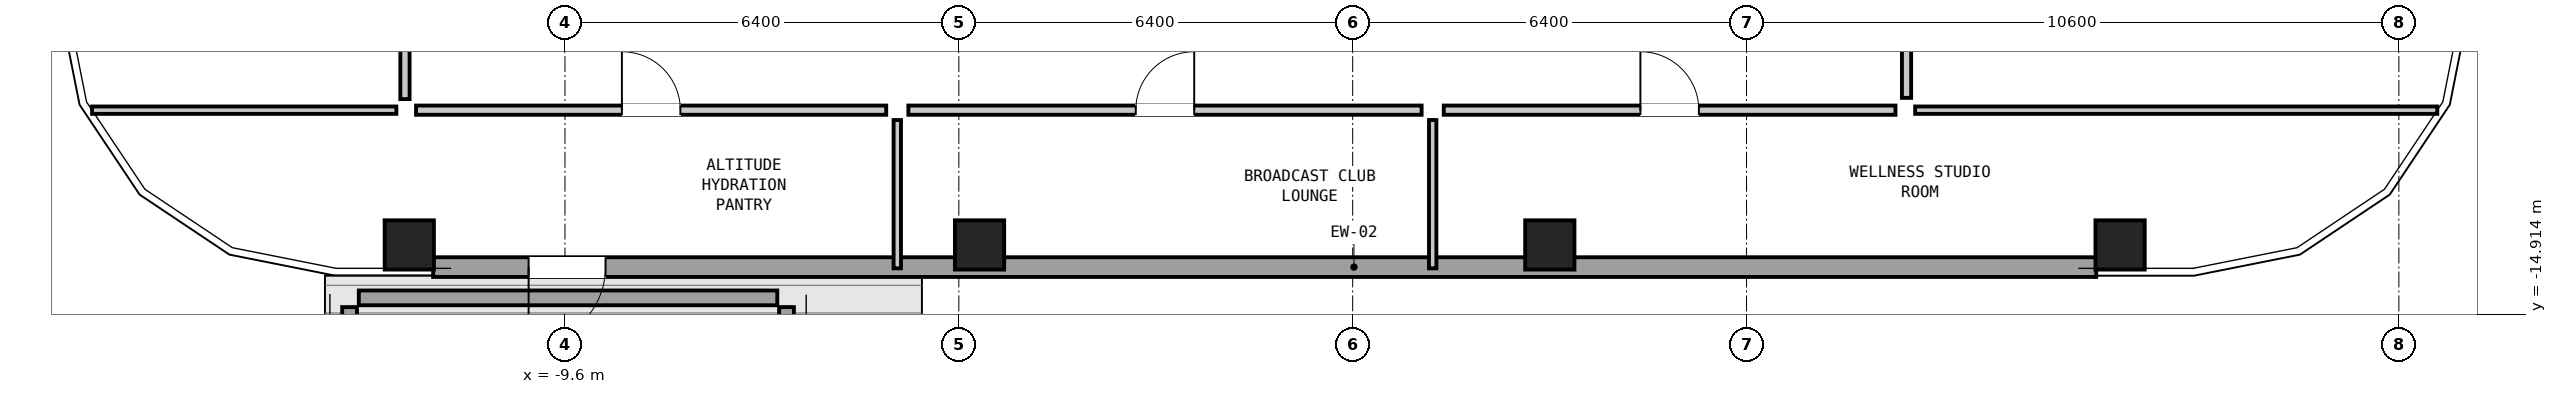
"""IFC4 building model, lengths in metres.
Left out: names, types, materials, properties, quantities, classifications, styles, units other than length and angle.
Written with IfcOpenShell. Run it as: python <this file> out.ifc"""

import sys

from ifc_helpers import new_model, si_unit, direction, frame, frame_2d, origin, origin_2d, place, context, subcontext, project, spatial, rectangle, hollow_rectangle, extrude, element, fill, save


model = new_model("IFC4")
c1 = context("Model", 3, precision=1e-05, world=origin(), true_north=direction((0.0, 1.0)))
c2 = subcontext(c1, "Body", "Model", "MODEL_VIEW")
j1 = project(units=[si_unit("LENGTHUNIT", "METRE"), si_unit("PLANEANGLEUNIT", "RADIAN")], contexts=[c1])
p1 = place(None, origin())
s1 = spatial("IfcSite", under=j1, at=p1, CompositionType="ELEMENT")
p2 = place(p1, origin())
s2 = spatial("IfcBuilding", under=s1, at=p2, CompositionType="ELEMENT")
p3 = place(p2, frame((0.0, 0.0, 104.85)))
s3 = spatial("IfcBuildingStorey", under=s2, at=p3, CompositionType="ELEMENT", Elevation=104.85)
for number, where, z_axis, x_axis in (
    (1, (-12.13, -13.79, 0.0), (0.0, 0.0, 1.0), (1.0, 0.0, 0.0)),
    (2, (-2.863, -13.79, 0.0), (0.0, 0.0, 1.0), (1.0, 0.0, 0.0)),
    (3, (6.403, -13.79, 0.0), (0.0, 0.0, 1.0), (1.0, 0.0, 0.0)),
    (4, (15.67, -13.79, 0.0), (0.0, 0.0, 1.0), (1.0, 0.0, 0.0)),
):
    element("IfcColumn", number, at=place(p3, frame(where, z_axis=z_axis, x_axis=x_axis)), inside=s3, PredefinedType="COLUMN", context=c2, shape_type="SweptSolid", body=[
        extrude(hollow_rectangle(XDim=0.8, YDim=0.8, WallThickness=0.05, at=origin_2d()), origin(), (0.0, 0.0, 1.0), 3.6),
    ])
p4 = place(p3, frame((-12.95, -14.65, 0.0), z_axis=(0.0, 0.0, 1.0), x_axis=(1.0, 0.0, 0.0)))
e5 = element("IfcWall", 5, at=p4, inside=s3, PredefinedType="PARAPET", context=c2, shape_type="SweptSolid", body=[
    extrude(rectangle(XDim=6.8, YDim=0.24, at=frame_2d((3.4, 0.0))), origin(), (0.0, 0.0, 1.0), 1.35),
])
for number, where, z_axis, x_axis in (
    (6, (-13.1, -16.7, 0.0), (0.0, 0.0, 1.0), (0.0, 1.0, 0.0)),
    (7, (-6.0, -16.7, 0.0), (0.0, 0.0, 1.0), (0.0, 1.0, 0.0)),
):
    element("IfcWall", number, at=place(p3, frame(where, z_axis=z_axis, x_axis=x_axis)), inside=s3, PredefinedType="PARAPET", context=c2, shape_type="SweptSolid", body=[
        extrude(rectangle(XDim=1.9, YDim=0.24, at=frame_2d((0.95, 0.0))), origin(), (0.0, 0.0, 1.0), 1.35),
    ])
p5 = place(p3, frame((15.282, -14.15, 0.0), z_axis=(0.0, 0.0, 1.0), x_axis=(-1.0, 0.0, 0.0)))
e8 = element("IfcWall", 8, at=p5, inside=s3, PredefinedType="SOLIDWALL", context=c2, shape_type="SweptSolid", body=[
    extrude(rectangle(XDim=27.024, YDim=0.32, at=frame_2d((13.512, 0.0))), origin(), (0.0, 0.0, 1.0), 2.082),
])
p6 = place(p5, frame((24.223, 0.0, 0.0)))
e9 = element("IfcOpeningElement", 9, at=p6, cuts=e8, PredefinedType="OPENING", context=c2, shape_type="SweptSolid", body=[
    extrude(rectangle(XDim=1.25, YDim=2.02, at=frame_2d((0.625, 1.01))), frame((0.0, 0.172, 0.0), z_axis=(0.0, -1.0, 0.0), x_axis=(1.0, 0.0, 0.0)), (0.0, 0.0, 1.0), 0.344),
])
p7 = place(p3, frame((-17.284, -11.6, 0.0), z_axis=(0.0, 0.0, 1.0), x_axis=(1.0, 0.0, 0.0)))
e10 = element("IfcWall", 10, at=p7, inside=s3, PredefinedType="PARTITIONING", context=c2, shape_type="SweptSolid", body=[
    extrude(rectangle(XDim=4.944, YDim=0.12, at=frame_2d((2.472, 0.0))), origin(), (0.0, 0.0, 1.0), 2.438),
])
p8 = place(p3, frame((12.34, -11.6, 0.0), z_axis=(0.0, 0.0, 1.0), x_axis=(1.0, 0.0, 0.0)))
e11 = element("IfcWall", 11, at=p8, inside=s3, PredefinedType="PARTITIONING", context=c2, shape_type="SweptSolid", body=[
    extrude(rectangle(XDim=8.484, YDim=0.12, at=frame_2d((4.242, 0.0))), origin(), (0.0, 0.0, 1.0), 2.438),
])
for number, where, z_axis, x_axis in (
    (12, (-4.2, -14.17, 0.0), (0.0, 0.0, 1.0), (0.0, 1.0, 0.0)),
    (13, (4.5, -14.17, 0.0), (0.0, 0.0, 1.0), (0.0, 1.0, 0.0)),
):
    element("IfcWall", number, at=place(p3, frame(where, z_axis=z_axis, x_axis=x_axis)), inside=s3, PredefinedType="PARTITIONING", context=c2, shape_type="SweptSolid", body=[
        extrude(rectangle(XDim=2.41, YDim=0.12, at=frame_2d((1.205, 0.0))), origin(), (0.0, 0.0, 1.0), 3.22),
    ])
p9 = place(p3, frame((-12.02, -11.6, 0.0), z_axis=(0.0, 0.0, 1.0), x_axis=(1.0, 0.0, 0.0)))
e14 = element("IfcWall", 14, at=p9, inside=s3, PredefinedType="PARTITIONING", context=c2, shape_type="SweptSolid", body=[
    extrude(rectangle(XDim=7.64, YDim=0.15, at=frame_2d((3.82, 0.0))), origin(), (0.0, 0.0, 1.0), 2.438),
])
p10 = place(p9, frame((3.345, 0.0, 0.0)))
e15 = element("IfcOpeningElement", 15, at=p10, cuts=e14, PredefinedType="OPENING", context=c2, shape_type="SweptSolid", body=[
    extrude(rectangle(XDim=0.95, YDim=2.1, at=frame_2d((0.475, 1.05))), frame((0.0, 0.087, 0.0), z_axis=(0.0, -1.0, 0.0), x_axis=(1.0, 0.0, 0.0)), (0.0, 0.0, 1.0), 0.174),
])
p11 = place(p3, frame((-4.02, -11.6, 0.0), z_axis=(0.0, 0.0, 1.0), x_axis=(1.0, 0.0, 0.0)))
e16 = element("IfcWall", 16, at=p11, inside=s3, PredefinedType="PARTITIONING", context=c2, shape_type="SweptSolid", body=[
    extrude(rectangle(XDim=8.34, YDim=0.15, at=frame_2d((4.17, 0.0))), origin(), (0.0, 0.0, 1.0), 3.22),
])
p12 = place(p11, frame((3.695, 0.0, 0.0)))
e17 = element("IfcOpeningElement", 17, at=p12, cuts=e16, PredefinedType="OPENING", context=c2, shape_type="SweptSolid", body=[
    extrude(rectangle(XDim=0.95, YDim=2.1, at=frame_2d((0.475, 1.05))), frame((0.0, 0.087, 0.0), z_axis=(0.0, -1.0, 0.0), x_axis=(1.0, 0.0, 0.0)), (0.0, 0.0, 1.0), 0.174),
])
p13 = place(p3, frame((4.68, -11.6, 0.0), z_axis=(0.0, 0.0, 1.0), x_axis=(1.0, 0.0, 0.0)))
e18 = element("IfcWall", 18, at=p13, inside=s3, PredefinedType="PARTITIONING", context=c2, shape_type="SweptSolid", body=[
    extrude(rectangle(XDim=7.34, YDim=0.15, at=frame_2d((3.67, 0.0))), origin(), (0.0, 0.0, 1.0), 2.438),
])
p14 = place(p13, frame((3.195, 0.0, 0.0)))
e19 = element("IfcOpeningElement", 19, at=p14, cuts=e18, PredefinedType="OPENING", context=c2, shape_type="SweptSolid", body=[
    extrude(rectangle(XDim=0.95, YDim=2.1, at=frame_2d((0.475, 1.05))), frame((0.0, 0.087, 0.0), z_axis=(0.0, -1.0, 0.0), x_axis=(1.0, 0.0, 0.0)), (0.0, 0.0, 1.0), 0.174),
])
p15 = place(p3, frame((-12.2, -11.42, 0.0), z_axis=(0.0, 0.0, 1.0), x_axis=(0.0, 1.0, 0.0)))
e20 = element("IfcWall", 20, at=p15, inside=s3, PredefinedType="PARTITIONING", context=c2, shape_type="SweptSolid", body=[
    extrude(rectangle(XDim=24.04, YDim=0.15, at=frame_2d((12.02, 0.0))), origin(), (0.0, 0.0, 1.0), 3.22),
])
p16 = place(p15, frame((11.545, 0.0, 0.0)))
e21 = element("IfcOpeningElement", 21, at=p16, cuts=e20, PredefinedType="OPENING", context=c2, shape_type="SweptSolid", body=[
    extrude(rectangle(XDim=0.95, YDim=2.1, at=frame_2d((0.475, 1.05))), frame((0.0, 0.087, 0.0), z_axis=(0.0, -1.0, 0.0), x_axis=(1.0, 0.0, 0.0)), (0.0, 0.0, 1.0), 0.174),
])
p17 = place(p3, frame((12.2, -11.4, 0.0), z_axis=(0.0, 0.0, 1.0), x_axis=(0.0, 1.0, 0.0)))
e22 = element("IfcWall", 22, at=p17, inside=s3, PredefinedType="PARTITIONING", context=c2, shape_type="SweptSolid", body=[
    extrude(rectangle(XDim=8.84, YDim=0.15, at=frame_2d((4.42, 0.0))), origin(), (0.0, 0.0, 1.0), 3.22),
])
p18 = place(p17, frame((3.945, 0.0, 0.0)))
e23 = element("IfcOpeningElement", 23, at=p18, cuts=e22, PredefinedType="OPENING", context=c2, shape_type="SweptSolid", body=[
    extrude(rectangle(XDim=0.95, YDim=2.1, at=frame_2d((0.475, 1.05))), frame((0.0, 0.087, 0.0), z_axis=(0.0, -1.0, 0.0), x_axis=(1.0, 0.0, 0.0)), (0.0, 0.0, 1.0), 0.174),
])
p19 = place(p6, origin())
e24 = element("IfcDoor", 24, at=p19, inside=s3, OperationType="SINGLE_SWING_RIGHT", PredefinedType="DOOR", context=c2, shape_type="SweptSolid", body=[
    extrude(rectangle(XDim=1.25, YDim=2.02, at=frame_2d((0.625, 1.01))), frame((0.0, 0.025, 0.0), z_axis=(0.0, -1.0, 0.0), x_axis=(1.0, 0.0, 0.0)), (0.0, 0.0, 1.0), 0.05),
])
fill(e9, e24)
p20 = place(p10, origin())
e25 = element("IfcDoor", 25, at=p20, inside=s3, OperationType="SINGLE_SWING_LEFT", PredefinedType="DOOR", context=c2, shape_type="SweptSolid", body=[
    extrude(rectangle(XDim=0.95, YDim=2.1, at=frame_2d((0.475, 1.05))), frame((0.0, 0.025, 0.0), z_axis=(0.0, -1.0, 0.0), x_axis=(1.0, 0.0, 0.0)), (0.0, 0.0, 1.0), 0.05),
])
fill(e15, e25)
p21 = place(p12, origin())
e26 = element("IfcDoor", 26, at=p21, inside=s3, OperationType="SINGLE_SWING_RIGHT", PredefinedType="DOOR", context=c2, shape_type="SweptSolid", body=[
    extrude(rectangle(XDim=0.95, YDim=2.1, at=frame_2d((0.475, 1.05))), frame((0.0, 0.025, 0.0), z_axis=(0.0, -1.0, 0.0), x_axis=(1.0, 0.0, 0.0)), (0.0, 0.0, 1.0), 0.05),
])
fill(e17, e26)
p22 = place(p14, origin())
e27 = element("IfcDoor", 27, at=p22, inside=s3, OperationType="SINGLE_SWING_LEFT", PredefinedType="DOOR", context=c2, shape_type="SweptSolid", body=[
    extrude(rectangle(XDim=0.95, YDim=2.1, at=frame_2d((0.475, 1.05))), frame((0.0, 0.025, 0.0), z_axis=(0.0, -1.0, 0.0), x_axis=(1.0, 0.0, 0.0)), (0.0, 0.0, 1.0), 0.05),
])
fill(e19, e27)
save(model, sys.argv[1])
